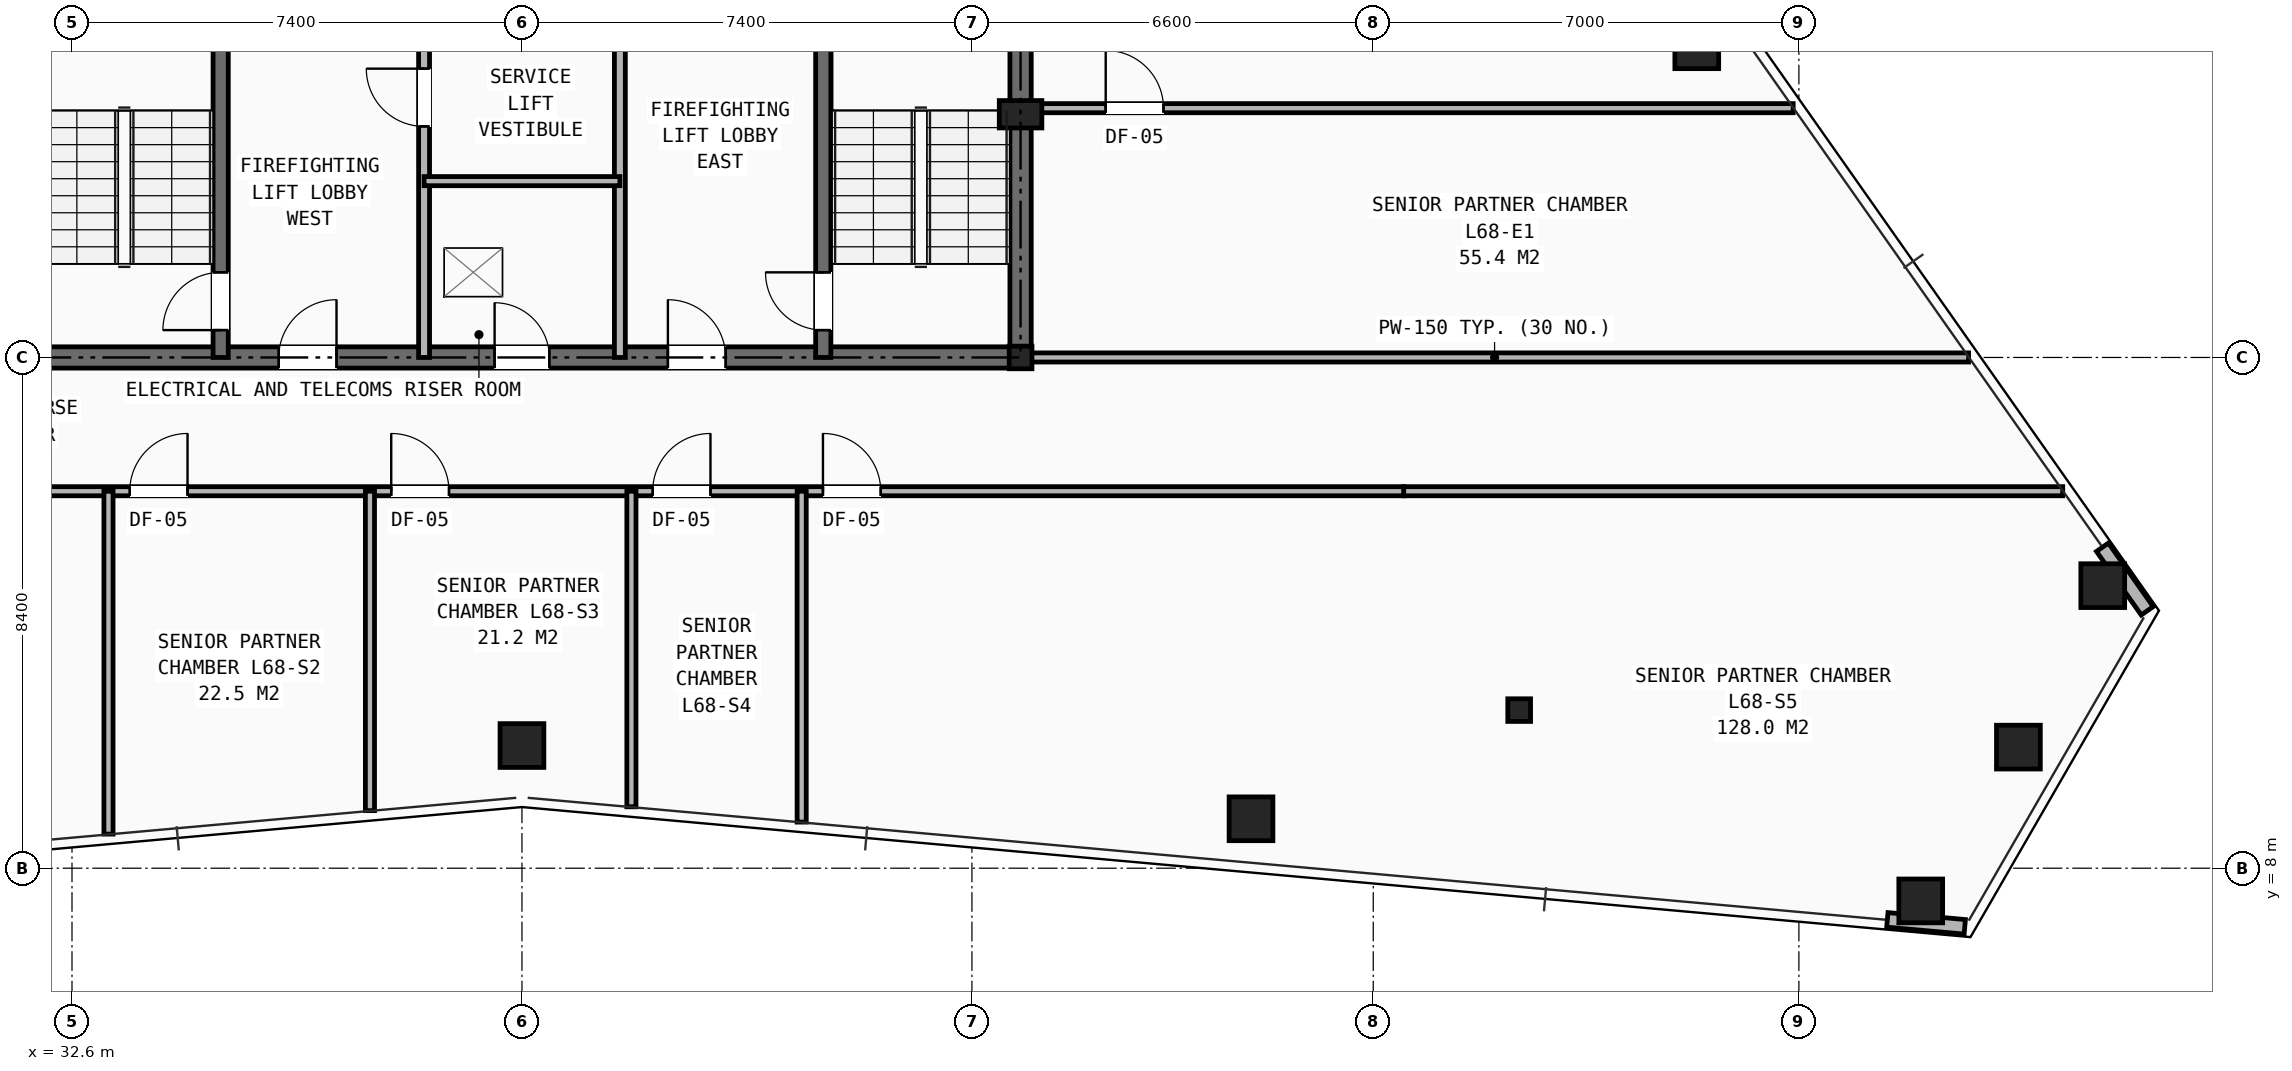
"""IFC4 building model, lengths in metres.
Left out: names, types, materials, properties, quantities, classifications, styles, units other than length and angle.
Written with IfcOpenShell. Run it as: python <this file> out.ifc"""

import sys

from ifc_helpers import new_model, si_unit, direction, frame, frame_2d, origin, origin_2d, place, context, subcontext, project, spatial, rectangle, hollow_rectangle, i_section, extrude, element, fill, save


model = new_model("IFC4")
c1 = context("Model", 3, precision=1e-05, world=origin(), true_north=direction((0.0, 1.0)))
c2 = subcontext(c1, "Body", "Model", "MODEL_VIEW")
j1 = project(units=[si_unit("LENGTHUNIT", "METRE"), si_unit("PLANEANGLEUNIT", "RADIAN")], contexts=[c1])
p1 = place(None, origin())
s1 = spatial("IfcSite", under=j1, at=p1, CompositionType="ELEMENT")
p2 = place(p1, origin())
s2 = spatial("IfcBuilding", under=s1, at=p2, CompositionType="ELEMENT")
p3 = place(p2, frame((0.0, 0.0, 239.9)))
s3 = spatial("IfcBuildingStorey", under=s2, at=p3, CompositionType="ELEMENT", Elevation=239.9)
for number, where, z_axis, x_axis in (
    (1, (48.2, 16.4, 0.0), (0.0, 0.0, 1.0), (1.0, 0.0, 0.0)),
    (2, (56.4, 10.6, 0.0), (0.0, 0.0, 1.0), (1.0, 0.0, 0.0)),
):
    element("IfcColumn", number, at=place(p3, frame(where, z_axis=z_axis, x_axis=x_axis)), inside=s3, PredefinedType="COLUMN", context=c2, shape_type="SweptSolid", body=[
        extrude(i_section(OverallWidth=0.374, OverallDepth=0.372, WebThickness=0.016, FlangeThickness=0.026, at=origin_2d()), origin(), (0.0, 0.0, 1.0), 3.5),
    ])
p4 = place(p3, frame((48.2, 20.4, 0.0), z_axis=(0.0, 0.0, 1.0), x_axis=(1.0, 0.0, 0.0)))
e3 = element("IfcColumn", 3, at=p4, inside=s3, PredefinedType="PILASTER", context=c2, shape_type="SweptSolid", body=[
    extrude(rectangle(XDim=0.7, YDim=0.45, at=origin_2d()), origin(), (0.0, 0.0, 1.0), 3.5),
])
for number, where, z_axis, x_axis in (
    (4, (40.0, 10.018, 0.0), (0.0, 0.0, 1.0), (1.0, 0.0, 0.0)),
    (5, (51.99, 8.812, 0.0), (0.0, 0.0, 1.0), (1.0, 0.0, 0.0)),
    (6, (63.004, 7.462, 0.0), (0.0, 0.0, 1.0), (1.0, 0.0, 0.0)),
    (7, (64.61, 9.991, 0.0), (0.0, 0.0, 1.0), (1.0, 0.0, 0.0)),
    (8, (65.997, 12.647, 0.0), (0.0, 0.0, 1.0), (1.0, 0.0, 0.0)),
    (9, (59.321, 21.51, 0.0), (0.0, 0.0, 1.0), (1.0, 0.0, 0.0)),
):
    element("IfcColumn", number, at=place(p3, frame(where, z_axis=z_axis, x_axis=x_axis)), inside=s3, PredefinedType="COLUMN", context=c2, shape_type="SweptSolid", body=[
        extrude(hollow_rectangle(XDim=0.72, YDim=0.72, WallThickness=0.05, at=origin_2d()), origin(), (0.0, 0.0, 1.0), 3.5),
    ])
for number, where, z_axis, x_axis in (
    (10, (62.455, 7.15, 0.0), (0.0, 0.0, 1.0), (0.996, -0.089, 0.0)),
    (11, (66.729, 12.233, 0.0), (0.0, 0.0, 1.0), (-0.575, 0.818, 0.0)),
):
    element("IfcWall", number, at=place(p3, frame(where, z_axis=z_axis, x_axis=x_axis)), inside=s3, PredefinedType="SHEAR", context=c2, shape_type="SweptSolid", body=[
        extrude(rectangle(XDim=1.279, YDim=0.24, at=frame_2d((0.639, 0.0))), origin(), (0.0, 0.0, 1.0), 2.623),
    ])
p5 = place(p3, frame((31.8, 16.4, 0.0), z_axis=(0.0, 0.0, 1.0), x_axis=(1.0, 0.0, 0.0)))
e12 = element("IfcWall", 12, at=p5, inside=s3, PredefinedType="SHEAR", context=c2, shape_type="SweptSolid", body=[
    extrude(rectangle(XDim=16.4, YDim=0.35, at=frame_2d((8.2, 0.0))), origin(), (0.0, 0.0, 1.0), 3.25),
])
p6 = place(p5, frame((7.75, 0.0, 0.0)))
e13 = element("IfcOpeningElement", 13, at=p6, cuts=e12, PredefinedType="OPENING", context=c2, shape_type="SweptSolid", body=[
    extrude(rectangle(XDim=0.9, YDim=2.1, at=frame_2d((0.45, 1.05))), frame((0.0, 0.185, 0.0), z_axis=(0.0, -1.0, 0.0), x_axis=(1.0, 0.0, 0.0)), (0.0, 0.0, 1.0), 0.37),
])
p7 = place(p5, frame((4.2, 0.0, 0.0)))
e14 = element("IfcOpeningElement", 14, at=p7, cuts=e12, PredefinedType="OPENING", context=c2, shape_type="SweptSolid", body=[
    extrude(rectangle(XDim=0.95, YDim=2.1, at=frame_2d((0.475, 1.05))), frame((0.0, 0.185, 0.0), z_axis=(0.0, -1.0, 0.0), x_axis=(1.0, 0.0, 0.0)), (0.0, 0.0, 1.0), 0.37),
])
p8 = place(p5, frame((10.6, 0.0, 0.0)))
e15 = element("IfcOpeningElement", 15, at=p8, cuts=e12, PredefinedType="OPENING", context=c2, shape_type="SweptSolid", body=[
    extrude(rectangle(XDim=0.95, YDim=2.1, at=frame_2d((0.475, 1.05))), frame((0.0, 0.185, 0.0), z_axis=(0.0, -1.0, 0.0), x_axis=(1.0, 0.0, 0.0)), (0.0, 0.0, 1.0), 0.37),
])
p9 = place(p3, frame((48.2, 16.4, 0.0), z_axis=(0.0, 0.0, 1.0), x_axis=(0.0, 1.0, 0.0)))
e16 = element("IfcWall", 16, at=p9, inside=s3, PredefinedType="SHEAR", context=c2, shape_type="SweptSolid", body=[
    extrude(rectangle(XDim=14.8, YDim=0.35, at=frame_2d((7.4, 0.0))), origin(), (0.0, 0.0, 1.0), 3.25),
])
p10 = place(p9, frame((11.0, 0.0, 0.0)))
e17 = element("IfcOpeningElement", 17, at=p10, cuts=e16, PredefinedType="OPENING", context=c2, shape_type="SweptSolid", body=[
    extrude(rectangle(XDim=1.1, YDim=2.15, at=frame_2d((0.55, 1.075))), frame((0.0, 0.185, 0.0), z_axis=(0.0, -1.0, 0.0), x_axis=(1.0, 0.0, 0.0)), (0.0, 0.0, 1.0), 0.37),
])
p11 = place(p3, frame((35.045, 16.4, 0.0), z_axis=(0.0, 0.0, 1.0), x_axis=(0.0, 1.0, 0.0)))
e18 = element("IfcWall", 18, at=p11, inside=s3, PredefinedType="SHEAR", context=c2, shape_type="SweptSolid", body=[
    extrude(rectangle(XDim=8.4, YDim=0.25, at=frame_2d((4.2, 0.0))), origin(), (0.0, 0.0, 1.0), 3.25),
])
p12 = place(p11, frame((0.45, 0.0, 0.0)))
e19 = element("IfcOpeningElement", 19, at=p12, cuts=e18, PredefinedType="OPENING", context=c2, shape_type="SweptSolid", body=[
    extrude(rectangle(XDim=0.95, YDim=2.1, at=frame_2d((0.475, 1.05))), frame((0.0, 0.135, 0.0), z_axis=(0.0, -1.0, 0.0), x_axis=(1.0, 0.0, 0.0)), (0.0, 0.0, 1.0), 0.27),
])
p13 = place(p3, frame((44.955, 16.4, 0.0), z_axis=(0.0, 0.0, 1.0), x_axis=(0.0, 1.0, 0.0)))
e20 = element("IfcWall", 20, at=p13, inside=s3, PredefinedType="SHEAR", context=c2, shape_type="SweptSolid", body=[
    extrude(rectangle(XDim=8.4, YDim=0.25, at=frame_2d((4.2, 0.0))), origin(), (0.0, 0.0, 1.0), 3.25),
])
p14 = place(p13, frame((0.45, 0.0, 0.0)))
e21 = element("IfcOpeningElement", 21, at=p14, cuts=e20, PredefinedType="OPENING", context=c2, shape_type="SweptSolid", body=[
    extrude(rectangle(XDim=0.95, YDim=2.1, at=frame_2d((0.475, 1.05))), frame((0.0, 0.135, 0.0), z_axis=(0.0, -1.0, 0.0), x_axis=(1.0, 0.0, 0.0)), (0.0, 0.0, 1.0), 0.27),
])
p15 = place(p3, frame((38.39, 16.4, 0.0), z_axis=(0.0, 0.0, 1.0), x_axis=(0.0, 1.0, 0.0)))
e22 = element("IfcWall", 22, at=p15, inside=s3, PredefinedType="PARTITIONING", context=c2, shape_type="SweptSolid", body=[
    extrude(rectangle(XDim=8.4, YDim=0.18, at=frame_2d((4.2, 0.0))), origin(), (0.0, 0.0, 1.0), 2.705),
])
p16 = place(p15, frame((3.8, 0.0, 0.0)))
e23 = element("IfcOpeningElement", 23, at=p16, cuts=e22, PredefinedType="OPENING", context=c2, shape_type="SweptSolid", body=[
    extrude(rectangle(XDim=0.95, YDim=2.1, at=frame_2d((0.475, 1.05))), frame((0.0, 0.1, 0.0), z_axis=(0.0, -1.0, 0.0), x_axis=(1.0, 0.0, 0.0)), (0.0, 0.0, 1.0), 0.2),
])
p17 = place(p3, frame((41.61, 16.4, 0.0), z_axis=(0.0, 0.0, 1.0), x_axis=(0.0, 1.0, 0.0)))
e24 = element("IfcWall", 24, at=p17, inside=s3, PredefinedType="PARTITIONING", context=c2, shape_type="SweptSolid", body=[
    extrude(rectangle(XDim=8.4, YDim=0.18, at=frame_2d((4.2, 0.0))), origin(), (0.0, 0.0, 1.0), 2.705),
])
p18 = place(p3, frame((38.39, 19.3, 0.0), z_axis=(0.0, 0.0, 1.0), x_axis=(1.0, 0.0, 0.0)))
e25 = element("IfcWall", 25, at=p18, inside=s3, PredefinedType="PARTITIONING", context=c2, shape_type="SweptSolid", body=[
    extrude(rectangle(XDim=3.22, YDim=0.15, at=frame_2d((1.61, 0.0))), origin(), (0.0, 0.0, 1.0), 3.25),
])
p19 = place(p3, frame((54.5, 14.2, 0.0), z_axis=(0.0, 0.0, 1.0), x_axis=(1.0, 0.0, 0.0)))
e26 = element("IfcWall", 26, at=p19, inside=s3, PredefinedType="PARTITIONING", context=c2, shape_type="SweptSolid", body=[
    extrude(rectangle(XDim=10.839, YDim=0.15, at=frame_2d((5.419, 0.0))), origin(), (0.0, 0.0, 1.0), 2.265),
])
p20 = place(p3, frame((48.2, 16.4, 0.0), z_axis=(0.0, 0.0, 1.0), x_axis=(1.0, 0.0, 0.0)))
e27 = element("IfcWall", 27, at=p20, inside=s3, PredefinedType="PARTITIONING", context=c2, shape_type="SweptSolid", body=[
    extrude(rectangle(XDim=15.591, YDim=0.15, at=frame_2d((7.795, 0.0))), origin(), (0.0, 0.0, 1.0), 2.265),
])
p21 = place(p3, frame((25.5, 14.2, 0.0), z_axis=(0.0, 0.0, 1.0), x_axis=(1.0, 0.0, 0.0)))
e28 = element("IfcWall", 28, at=p21, inside=s3, PredefinedType="PARTITIONING", context=c2, shape_type="SweptSolid", body=[
    extrude(rectangle(XDim=29.0, YDim=0.15, at=frame_2d((14.5, 0.0))), origin(), (0.0, 0.0, 1.0), 2.265),
])
p22 = place(p21, frame((0.85, 0.0, 0.0)))
e29 = element("IfcOpeningElement", 29, at=p22, cuts=e28, PredefinedType="OPENING", context=c2, shape_type="SweptSolid", body=[
    extrude(rectangle(XDim=0.95, YDim=2.1, at=frame_2d((0.475, 1.05))), frame((0.0, 0.085, 0.0), z_axis=(0.0, -1.0, 0.0), x_axis=(1.0, 0.0, 0.0)), (0.0, 0.0, 1.0), 0.17),
])
p23 = place(p21, frame((8.05, 0.0, 0.0)))
e30 = element("IfcOpeningElement", 30, at=p23, cuts=e28, PredefinedType="OPENING", context=c2, shape_type="SweptSolid", body=[
    extrude(rectangle(XDim=0.95, YDim=2.1, at=frame_2d((0.475, 1.05))), frame((0.0, 0.085, 0.0), z_axis=(0.0, -1.0, 0.0), x_axis=(1.0, 0.0, 0.0)), (0.0, 0.0, 1.0), 0.17),
])
p24 = place(p21, frame((12.35, 0.0, 0.0)))
e31 = element("IfcOpeningElement", 31, at=p24, cuts=e28, PredefinedType="OPENING", context=c2, shape_type="SweptSolid", body=[
    extrude(rectangle(XDim=0.95, YDim=2.1, at=frame_2d((0.475, 1.05))), frame((0.0, 0.085, 0.0), z_axis=(0.0, -1.0, 0.0), x_axis=(1.0, 0.0, 0.0)), (0.0, 0.0, 1.0), 0.17),
])
p25 = place(p21, frame((16.65, 0.0, 0.0)))
e32 = element("IfcOpeningElement", 32, at=p25, cuts=e28, PredefinedType="OPENING", context=c2, shape_type="SweptSolid", body=[
    extrude(rectangle(XDim=0.95, YDim=2.1, at=frame_2d((0.475, 1.05))), frame((0.0, 0.085, 0.0), z_axis=(0.0, -1.0, 0.0), x_axis=(1.0, 0.0, 0.0)), (0.0, 0.0, 1.0), 0.17),
])
p26 = place(p21, frame((19.45, 0.0, 0.0)))
e33 = element("IfcOpeningElement", 33, at=p26, cuts=e28, PredefinedType="OPENING", context=c2, shape_type="SweptSolid", body=[
    extrude(rectangle(XDim=0.95, YDim=2.1, at=frame_2d((0.475, 1.05))), frame((0.0, 0.085, 0.0), z_axis=(0.0, -1.0, 0.0), x_axis=(1.0, 0.0, 0.0)), (0.0, 0.0, 1.0), 0.17),
])
p27 = place(p3, frame((33.2, 8.561, 0.0), z_axis=(0.0, 0.0, 1.0), x_axis=(0.0, 1.0, 0.0)))
e34 = element("IfcWall", 34, at=p27, inside=s3, PredefinedType="PARTITIONING", context=c2, shape_type="SweptSolid", body=[
    extrude(rectangle(XDim=5.639, YDim=0.15, at=frame_2d((2.82, 0.0))), origin(), (0.0, 0.0, 1.0), 2.628),
])
p28 = place(p3, frame((37.5, 8.947, 0.0), z_axis=(0.0, 0.0, 1.0), x_axis=(0.0, 1.0, 0.0)))
e35 = element("IfcWall", 35, at=p28, inside=s3, PredefinedType="PARTITIONING", context=c2, shape_type="SweptSolid", body=[
    extrude(rectangle(XDim=5.253, YDim=0.15, at=frame_2d((2.626, 0.0))), origin(), (0.0, 0.0, 1.0), 2.265),
])
p29 = place(p3, frame((41.8, 9.01, 0.0), z_axis=(0.0, 0.0, 1.0), x_axis=(0.0, 1.0, 0.0)))
e36 = element("IfcWall", 36, at=p29, inside=s3, PredefinedType="PARTITIONING", context=c2, shape_type="SweptSolid", body=[
    extrude(rectangle(XDim=5.19, YDim=0.15, at=frame_2d((2.595, 0.0))), origin(), (0.0, 0.0, 1.0), 2.628),
])
p30 = place(p3, frame((44.6, 8.758, 0.0), z_axis=(0.0, 0.0, 1.0), x_axis=(0.0, 1.0, 0.0)))
e37 = element("IfcWall", 37, at=p30, inside=s3, PredefinedType="PARTITIONING", context=c2, shape_type="SweptSolid", body=[
    extrude(rectangle(XDim=5.442, YDim=0.15, at=frame_2d((2.721, 0.0))), origin(), (0.0, 0.0, 1.0), 2.628),
])
p31 = place(p3, frame((48.2, 20.5, 0.0), z_axis=(0.0, 0.0, 1.0), x_axis=(1.0, 0.0, 0.0)))
e38 = element("IfcWall", 38, at=p31, inside=s3, PredefinedType="PARTITIONING", context=c2, shape_type="SweptSolid", body=[
    extrude(rectangle(XDim=12.706, YDim=0.15, at=frame_2d((6.353, 0.0))), origin(), (0.0, 0.0, 1.0), 2.265),
])
p32 = place(p31, frame((1.4, 0.0, 0.0)))
e39 = element("IfcOpeningElement", 39, at=p32, cuts=e38, PredefinedType="OPENING", context=c2, shape_type="SweptSolid", body=[
    extrude(rectangle(XDim=0.95, YDim=2.1, at=frame_2d((0.475, 1.05))), frame((0.0, 0.085, 0.0), z_axis=(0.0, -1.0, 0.0), x_axis=(1.0, 0.0, 0.0)), (0.0, 0.0, 1.0), 0.17),
])
p33 = place(p6, origin())
e40 = element("IfcDoor", 40, at=p33, inside=s3, OperationType="SINGLE_SWING_LEFT", PredefinedType="DOOR", context=c2, shape_type="SweptSolid", body=[
    extrude(rectangle(XDim=0.9, YDim=2.1, at=frame_2d((0.45, 1.05))), frame((0.0, 0.025, 0.0), z_axis=(0.0, -1.0, 0.0), x_axis=(1.0, 0.0, 0.0)), (0.0, 0.0, 1.0), 0.05),
])
fill(e13, e40)
p34 = place(p16, origin())
e41 = element("IfcDoor", 41, at=p34, inside=s3, OperationType="SINGLE_SWING_RIGHT", PredefinedType="DOOR", context=c2, shape_type="SweptSolid", body=[
    extrude(rectangle(XDim=0.95, YDim=2.1, at=frame_2d((0.475, 1.05))), frame((0.0, 0.025, 0.0), z_axis=(0.0, -1.0, 0.0), x_axis=(1.0, 0.0, 0.0)), (0.0, 0.0, 1.0), 0.05),
])
fill(e23, e41)
p35 = place(p12, origin())
e42 = element("IfcDoor", 42, at=p35, inside=s3, OperationType="SINGLE_SWING_LEFT", PredefinedType="DOOR", context=c2, shape_type="SweptSolid", body=[
    extrude(rectangle(XDim=0.95, YDim=2.1, at=frame_2d((0.475, 1.05))), frame((0.0, 0.025, 0.0), z_axis=(0.0, -1.0, 0.0), x_axis=(1.0, 0.0, 0.0)), (0.0, 0.0, 1.0), 0.05),
])
fill(e19, e42)
p36 = place(p14, origin())
e43 = element("IfcDoor", 43, at=p36, inside=s3, OperationType="SINGLE_SWING_RIGHT", PredefinedType="DOOR", context=c2, shape_type="SweptSolid", body=[
    extrude(rectangle(XDim=0.95, YDim=2.1, at=frame_2d((0.475, 1.05))), frame((0.0, 0.025, 0.0), z_axis=(0.0, -1.0, 0.0), x_axis=(1.0, 0.0, 0.0)), (0.0, 0.0, 1.0), 0.05),
])
fill(e21, e43)
p37 = place(p7, origin())
e44 = element("IfcDoor", 44, at=p37, inside=s3, OperationType="SINGLE_SWING_RIGHT", PredefinedType="DOOR", context=c2, shape_type="SweptSolid", body=[
    extrude(rectangle(XDim=0.95, YDim=2.1, at=frame_2d((0.475, 1.05))), frame((0.0, 0.025, 0.0), z_axis=(0.0, -1.0, 0.0), x_axis=(1.0, 0.0, 0.0)), (0.0, 0.0, 1.0), 0.05),
])
fill(e14, e44)
p38 = place(p8, origin())
e45 = element("IfcDoor", 45, at=p38, inside=s3, OperationType="SINGLE_SWING_LEFT", PredefinedType="DOOR", context=c2, shape_type="SweptSolid", body=[
    extrude(rectangle(XDim=0.95, YDim=2.1, at=frame_2d((0.475, 1.05))), frame((0.0, 0.025, 0.0), z_axis=(0.0, -1.0, 0.0), x_axis=(1.0, 0.0, 0.0)), (0.0, 0.0, 1.0), 0.05),
])
fill(e15, e45)
p39 = place(p23, origin())
e46 = element("IfcDoor", 46, at=p39, inside=s3, OperationType="SINGLE_SWING_RIGHT", PredefinedType="DOOR", context=c2, shape_type="SweptSolid", body=[
    extrude(rectangle(XDim=0.95, YDim=2.1, at=frame_2d((0.475, 1.05))), frame((0.0, 0.025, 0.0), z_axis=(0.0, -1.0, 0.0), x_axis=(1.0, 0.0, 0.0)), (0.0, 0.0, 1.0), 0.05),
])
fill(e30, e46)
p40 = place(p24, origin())
e47 = element("IfcDoor", 47, at=p40, inside=s3, OperationType="SINGLE_SWING_LEFT", PredefinedType="DOOR", context=c2, shape_type="SweptSolid", body=[
    extrude(rectangle(XDim=0.95, YDim=2.1, at=frame_2d((0.475, 1.05))), frame((0.0, 0.025, 0.0), z_axis=(0.0, -1.0, 0.0), x_axis=(1.0, 0.0, 0.0)), (0.0, 0.0, 1.0), 0.05),
])
fill(e31, e47)
p41 = place(p25, origin())
e48 = element("IfcDoor", 48, at=p41, inside=s3, OperationType="SINGLE_SWING_RIGHT", PredefinedType="DOOR", context=c2, shape_type="SweptSolid", body=[
    extrude(rectangle(XDim=0.95, YDim=2.1, at=frame_2d((0.475, 1.05))), frame((0.0, 0.025, 0.0), z_axis=(0.0, -1.0, 0.0), x_axis=(1.0, 0.0, 0.0)), (0.0, 0.0, 1.0), 0.05),
])
fill(e32, e48)
p42 = place(p26, origin())
e49 = element("IfcDoor", 49, at=p42, inside=s3, OperationType="SINGLE_SWING_LEFT", PredefinedType="DOOR", context=c2, shape_type="SweptSolid", body=[
    extrude(rectangle(XDim=0.95, YDim=2.1, at=frame_2d((0.475, 1.05))), frame((0.0, 0.025, 0.0), z_axis=(0.0, -1.0, 0.0), x_axis=(1.0, 0.0, 0.0)), (0.0, 0.0, 1.0), 0.05),
])
fill(e33, e49)
p43 = place(p32, origin())
e50 = element("IfcDoor", 50, at=p43, inside=s3, OperationType="SINGLE_SWING_LEFT", PredefinedType="DOOR", context=c2, shape_type="SweptSolid", body=[
    extrude(rectangle(XDim=0.95, YDim=2.1, at=frame_2d((0.475, 1.05))), frame((0.0, 0.025, 0.0), z_axis=(0.0, -1.0, 0.0), x_axis=(1.0, 0.0, 0.0)), (0.0, 0.0, 1.0), 0.05),
])
fill(e39, e50)
save(model, sys.argv[1])
